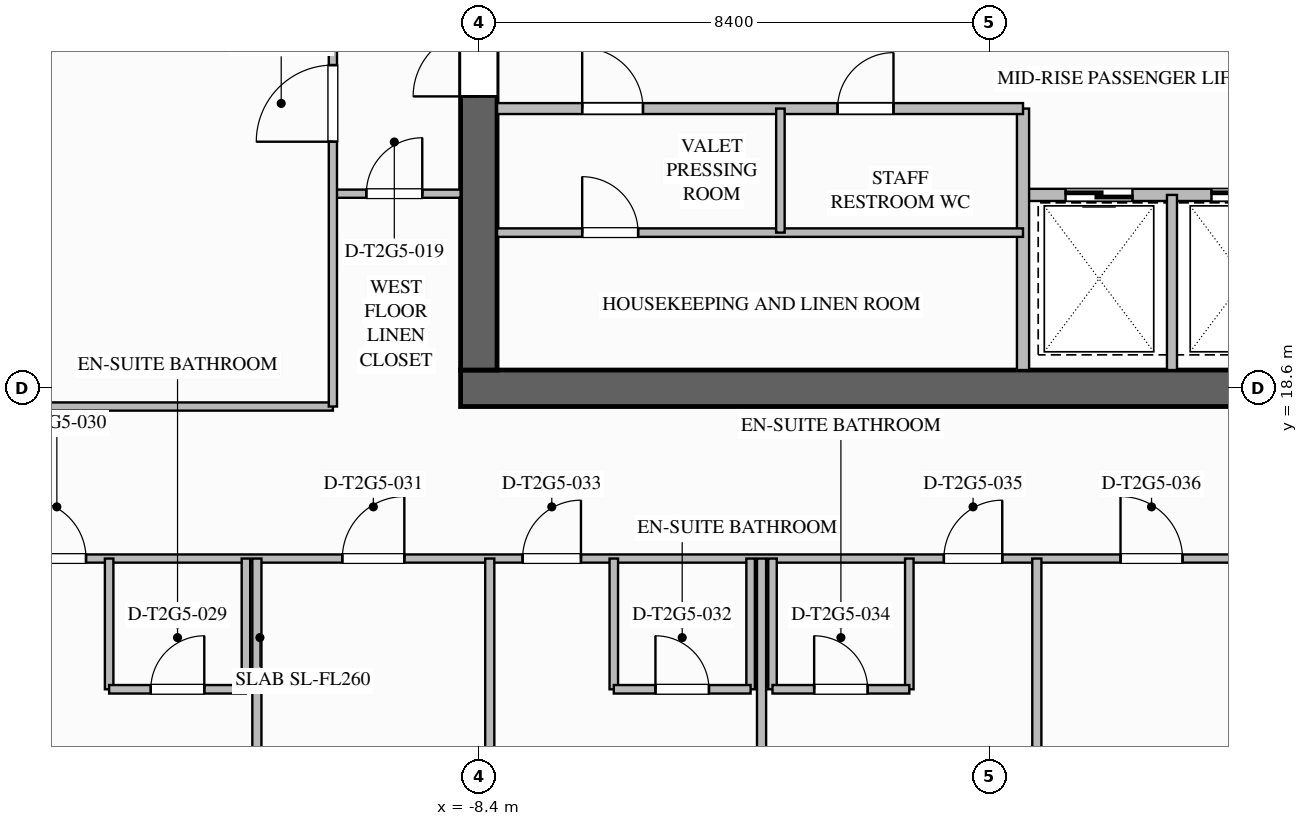
"""IFC4 building model, lengths in metres.
Left out: names, types, materials, properties, quantities, classifications, styles, units other than length and angle.
Written with IfcOpenShell. Run it as: python <this file> out.ifc"""

import sys

from ifc_helpers import new_model, si_unit, direction, frame, frame_2d, origin, place, context, subcontext, project, spatial, rectangle, extrude, element, fill, save


model = new_model("IFC4")
c1 = context("Model", 3, precision=1e-05, world=origin(), true_north=direction((0.0, 1.0)))
c2 = subcontext(c1, "Body", "Model", "MODEL_VIEW")
j1 = project(units=[si_unit("LENGTHUNIT", "METRE"), si_unit("PLANEANGLEUNIT", "RADIAN")], contexts=[c1])
p1 = place(None, origin())
s1 = spatial("IfcSite", under=j1, at=p1, CompositionType="ELEMENT")
p2 = place(p1, origin())
s2 = spatial("IfcBuilding", under=s1, at=p2, CompositionType="ELEMENT")
p3 = place(p2, frame((0.0, 0.0, 133.8)))
s3 = spatial("IfcBuildingStorey", under=s2, at=p3, CompositionType="ELEMENT", Elevation=133.8)
p4 = place(p3, frame((8.7, 18.6, 0.0), z_axis=(0.0, 0.0, 1.0), x_axis=(-1.0, 0.0, 0.0)))
e1 = element("IfcWall", 1, at=p4, inside=s3, PredefinedType="SHEAR", context=c2, shape_type="SweptSolid", body=[
    extrude(rectangle(XDim=17.4, YDim=0.6, at=frame_2d((8.7, 0.0))), origin(), (0.0, 0.0, 1.0), 3.5),
])
p5 = place(p3, frame((-8.4, 18.9, 0.0), z_axis=(0.0, 0.0, 1.0), x_axis=(0.0, 1.0, 0.0)))
e2 = element("IfcWall", 2, at=p5, inside=s3, PredefinedType="SHEAR", context=c2, shape_type="SweptSolid", body=[
    extrude(rectangle(XDim=16.2, YDim=0.6, at=frame_2d((8.1, 0.0))), origin(), (0.0, 0.0, 1.0), 3.5),
])
p6 = place(p5, frame((4.5, 0.0, 0.0)))
e3 = element("IfcOpeningElement", 3, at=p6, cuts=e2, PredefinedType="OPENING", context=c2, shape_type="SweptSolid", body=[
    extrude(rectangle(XDim=1.08, YDim=2.04, at=frame_2d((0.54, 1.02))), frame((0.0, 0.31, 0.0), z_axis=(0.0, -1.0, 0.0), x_axis=(1.0, 0.0, 0.0)), (0.0, 0.0, 1.0), 0.62),
])
p7 = place(p3, frame((8.1, 21.78, 0.0), z_axis=(0.0, 0.0, 1.0), x_axis=(-1.0, 0.0, 0.0)))
e4 = element("IfcWall", 4, at=p7, inside=s3, PredefinedType="SOLIDWALL", context=c2, shape_type="SweptSolid", body=[
    extrude(rectangle(XDim=7.55, YDim=0.2, at=frame_2d((3.775, 0.0))), origin(), (0.0, 0.0, 1.0), 3.24),
])
p8 = place(p7, frame((5.75, 0.0, 0.0)))
e5 = element("IfcOpeningElement", 5, at=p8, cuts=e4, PredefinedType="OPENING", context=c2, shape_type="SweptSolid", body=[
    extrude(rectangle(XDim=1.1, YDim=2.2, at=frame_2d((0.55, 1.1))), frame((0.0, 0.11, 0.0), z_axis=(0.0, -1.0, 0.0), x_axis=(1.0, 0.0, 0.0)), (0.0, 0.0, 1.0), 0.22),
])
p9 = place(p7, frame((3.35, 0.0, 0.0)))
e6 = element("IfcOpeningElement", 6, at=p9, cuts=e4, PredefinedType="OPENING", context=c2, shape_type="SweptSolid", body=[
    extrude(rectangle(XDim=1.1, YDim=2.2, at=frame_2d((0.55, 1.1))), frame((0.0, 0.11, 0.0), z_axis=(0.0, -1.0, 0.0), x_axis=(1.0, 0.0, 0.0)), (0.0, 0.0, 1.0), 0.22),
])
p10 = place(p7, frame((0.95, 0.0, 0.0)))
e7 = element("IfcOpeningElement", 7, at=p10, cuts=e4, PredefinedType="OPENING", context=c2, shape_type="SweptSolid", body=[
    extrude(rectangle(XDim=1.1, YDim=2.2, at=frame_2d((0.55, 1.1))), frame((0.0, 0.11, 0.0), z_axis=(0.0, -1.0, 0.0), x_axis=(1.0, 0.0, 0.0)), (0.0, 0.0, 1.0), 0.22),
])
p11 = place(p3, frame((0.55, 18.9, 0.0), z_axis=(0.0, 0.0, 1.0), x_axis=(0.0, 1.0, 0.0)))
e8 = element("IfcWall", 8, at=p11, inside=s3, PredefinedType="SOLIDWALL", context=c2, shape_type="SweptSolid", body=[
    extrude(rectangle(XDim=4.3, YDim=0.2, at=frame_2d((2.15, 0.0))), origin(), (0.0, 0.0, 1.0), 3.24),
])
p12 = place(p3, frame((3.0, 18.9, 0.0), z_axis=(0.0, 0.0, 1.0), x_axis=(0.0, 1.0, 0.0)))
e9 = element("IfcWall", 9, at=p12, inside=s3, PredefinedType="PARTITIONING", context=c2, shape_type="SweptSolid", body=[
    extrude(rectangle(XDim=2.88, YDim=0.165, at=frame_2d((1.44, 0.0))), origin(), (0.0, 0.0, 1.0), 3.24),
])
p13 = place(p3, frame((-8.1, 23.2, 0.0), z_axis=(0.0, 0.0, 1.0), x_axis=(1.0, 0.0, 0.0)))
e10 = element("IfcWall", 10, at=p13, inside=s3, PredefinedType="SOLIDWALL", context=c2, shape_type="SweptSolid", body=[
    extrude(rectangle(XDim=8.65, YDim=0.18, at=frame_2d((4.325, 0.0))), origin(), (0.0, 0.0, 1.0), 3.24),
])
p14 = place(p13, frame((1.4, 0.0, 0.0)))
e11 = element("IfcOpeningElement", 11, at=p14, cuts=e10, PredefinedType="OPENING", context=c2, shape_type="SweptSolid", body=[
    extrude(rectangle(XDim=1.0, YDim=2.1, at=frame_2d((0.5, 1.05))), frame((0.0, 0.1, 0.0), z_axis=(0.0, -1.0, 0.0), x_axis=(1.0, 0.0, 0.0)), (0.0, 0.0, 1.0), 0.2),
])
p15 = place(p13, frame((5.6, 0.0, 0.0)))
e12 = element("IfcOpeningElement", 12, at=p15, cuts=e10, PredefinedType="OPENING", context=c2, shape_type="SweptSolid", body=[
    extrude(rectangle(XDim=0.92, YDim=2.1, at=frame_2d((0.46, 1.05))), frame((0.0, 0.1, 0.0), z_axis=(0.0, -1.0, 0.0), x_axis=(1.0, 0.0, 0.0)), (0.0, 0.0, 1.0), 0.2),
])
p16 = place(p3, frame((-8.1, 21.16, 0.0), z_axis=(0.0, 0.0, 1.0), x_axis=(1.0, 0.0, 0.0)))
e13 = element("IfcWall", 13, at=p16, inside=s3, PredefinedType="PLUMBINGWALL", context=c2, shape_type="SweptSolid", body=[
    extrude(rectangle(XDim=8.65, YDim=0.14, at=frame_2d((4.325, 0.0))), origin(), (0.0, 0.0, 1.0), 3.24),
])
p17 = place(p16, frame((1.4, 0.0, 0.0)))
e14 = element("IfcOpeningElement", 14, at=p17, cuts=e13, PredefinedType="OPENING", context=c2, shape_type="SweptSolid", body=[
    extrude(rectangle(XDim=0.92, YDim=2.1, at=frame_2d((0.46, 1.05))), frame((0.0, 0.08, 0.0), z_axis=(0.0, -1.0, 0.0), x_axis=(1.0, 0.0, 0.0)), (0.0, 0.0, 1.0), 0.16),
])
p18 = place(p3, frame((-3.44, 21.16, 0.0), z_axis=(0.0, 0.0, 1.0), x_axis=(0.0, 1.0, 0.0)))
e15 = element("IfcWall", 15, at=p18, inside=s3, PredefinedType="PLUMBINGWALL", context=c2, shape_type="SweptSolid", body=[
    extrude(rectangle(XDim=2.04, YDim=0.14, at=frame_2d((1.02, 0.0))), origin(), (0.0, 0.0, 1.0), 3.24),
])
p19 = place(p3, frame((-10.8, 21.8, 0.0), z_axis=(0.0, 0.0, 1.0), x_axis=(1.0, 0.0, 0.0)))
e16 = element("IfcWall", 16, at=p19, inside=s3, PredefinedType="PARTITIONING", context=c2, shape_type="SweptSolid", body=[
    extrude(rectangle(XDim=2.1, YDim=0.135, at=frame_2d((1.05, 0.0))), origin(), (0.0, 0.0, 1.0), 3.24),
])
p20 = place(p19, frame((0.55, 0.0, 0.0)))
e17 = element("IfcOpeningElement", 17, at=p20, cuts=e16, PredefinedType="OPENING", context=c2, shape_type="SweptSolid", body=[
    extrude(rectangle(XDim=0.92, YDim=2.1, at=frame_2d((0.46, 1.05))), frame((0.0, 0.077, 0.0), z_axis=(0.0, -1.0, 0.0), x_axis=(1.0, 0.0, 0.0)), (0.0, 0.0, 1.0), 0.155),
])
p21 = place(p3, frame((-16.2, 18.3, 0.0), z_axis=(0.0, 0.0, 1.0), x_axis=(1.0, 0.0, 0.0)))
e18 = element("IfcWall", 18, at=p21, inside=s3, PredefinedType="PARTITIONING", context=c2, shape_type="SweptSolid", body=[
    extrude(rectangle(XDim=5.4, YDim=0.135, at=frame_2d((2.7, 0.0))), origin(), (0.0, 0.0, 1.0), 3.24),
])
p22 = place(p3, frame((-16.2, 15.8, 0.0), z_axis=(0.0, 0.0, 1.0), x_axis=(1.0, 0.0, 0.0)))
e19 = element("IfcWall", 19, at=p22, inside=s3, PredefinedType="PARTITIONING", context=c2, shape_type="SweptSolid", body=[
    extrude(rectangle(XDim=24.9, YDim=0.135, at=frame_2d((12.45, 0.0))), origin(), (0.0, 0.0, 1.0), 3.24),
])
p23 = place(p22, frame((0.38, 0.0, 0.0)))
e20 = element("IfcOpeningElement", 20, at=p23, cuts=e19, PredefinedType="OPENING", context=c2, shape_type="SweptSolid", body=[
    extrude(rectangle(XDim=0.96, YDim=2.15, at=frame_2d((0.48, 1.075))), frame((0.0, 0.077, 0.0), z_axis=(0.0, -1.0, 0.0), x_axis=(1.0, 0.0, 0.0)), (0.0, 0.0, 1.0), 0.155),
])
p24 = place(p22, frame((5.555, 0.0, 0.0)))
e21 = element("IfcOpeningElement", 21, at=p24, cuts=e19, PredefinedType="OPENING", context=c2, shape_type="SweptSolid", body=[
    extrude(rectangle(XDim=1.02, YDim=2.15, at=frame_2d((0.51, 1.075))), frame((0.0, 0.077, 0.0), z_axis=(0.0, -1.0, 0.0), x_axis=(1.0, 0.0, 0.0)), (0.0, 0.0, 1.0), 0.155),
])
p25 = place(p22, frame((8.52, 0.0, 0.0)))
e22 = element("IfcOpeningElement", 22, at=p25, cuts=e19, PredefinedType="OPENING", context=c2, shape_type="SweptSolid", body=[
    extrude(rectangle(XDim=0.96, YDim=2.15, at=frame_2d((0.48, 1.075))), frame((0.0, 0.077, 0.0), z_axis=(0.0, -1.0, 0.0), x_axis=(1.0, 0.0, 0.0)), (0.0, 0.0, 1.0), 0.155),
])
p26 = place(p22, frame((15.448, 0.0, 0.0)))
e23 = element("IfcOpeningElement", 23, at=p26, cuts=e19, PredefinedType="OPENING", context=c2, shape_type="SweptSolid", body=[
    extrude(rectangle(XDim=0.96, YDim=2.15, at=frame_2d((0.48, 1.075))), frame((0.0, 0.077, 0.0), z_axis=(0.0, -1.0, 0.0), x_axis=(1.0, 0.0, 0.0)), (0.0, 0.0, 1.0), 0.155),
])
p27 = place(p22, frame((18.354, 0.0, 0.0)))
e24 = element("IfcOpeningElement", 24, at=p27, cuts=e19, PredefinedType="OPENING", context=c2, shape_type="SweptSolid", body=[
    extrude(rectangle(XDim=1.02, YDim=2.15, at=frame_2d((0.51, 1.075))), frame((0.0, 0.077, 0.0), z_axis=(0.0, -1.0, 0.0), x_axis=(1.0, 0.0, 0.0)), (0.0, 0.0, 1.0), 0.155),
])
p28 = place(p22, frame((23.56, 0.0, 0.0)))
e25 = element("IfcOpeningElement", 25, at=p28, cuts=e19, PredefinedType="OPENING", context=c2, shape_type="SweptSolid", body=[
    extrude(rectangle(XDim=0.96, YDim=2.15, at=frame_2d((0.48, 1.075))), frame((0.0, 0.077, 0.0), z_axis=(0.0, -1.0, 0.0), x_axis=(1.0, 0.0, 0.0)), (0.0, 0.0, 1.0), 0.155),
])
p29 = place(p3, frame((-10.8, 18.3, 0.0), z_axis=(0.0, 0.0, 1.0), x_axis=(0.0, 1.0, 0.0)))
e26 = element("IfcWall", 26, at=p29, inside=s3, PredefinedType="PARTITIONING", context=c2, shape_type="SweptSolid", body=[
    extrude(rectangle(XDim=17.4, YDim=0.135, at=frame_2d((8.7, 0.0))), origin(), (0.0, 0.0, 1.0), 3.24),
])
p30 = place(p29, frame((4.355, 0.0, 0.0)))
e27 = element("IfcOpeningElement", 27, at=p30, cuts=e26, PredefinedType="OPENING", context=c2, shape_type="SweptSolid", body=[
    extrude(rectangle(XDim=1.26, YDim=2.2, at=frame_2d((0.63, 1.1))), frame((0.0, 0.077, 0.0), z_axis=(0.0, -1.0, 0.0), x_axis=(1.0, 0.0, 0.0)), (0.0, 0.0, 1.0), 0.155),
])
p31 = place(p29, frame((10.69, 0.0, 0.0)))
e28 = element("IfcOpeningElement", 28, at=p31, cuts=e26, PredefinedType="OPENING", context=c2, shape_type="SweptSolid", body=[
    extrude(rectangle(XDim=1.02, YDim=2.15, at=frame_2d((0.51, 1.075))), frame((0.0, 0.077, 0.0), z_axis=(0.0, -1.0, 0.0), x_axis=(1.0, 0.0, 0.0)), (0.0, 0.0, 1.0), 0.155),
])
p32 = place(p3, frame((-14.48, 15.8, 0.0), z_axis=(0.0, 0.0, 1.0), x_axis=(0.0, -1.0, 0.0)))
e29 = element("IfcWall", 29, at=p32, inside=s3, PredefinedType="PLUMBINGWALL", context=c2, shape_type="SweptSolid", body=[
    extrude(rectangle(XDim=2.15, YDim=0.14, at=frame_2d((1.075, 0.0))), origin(), (0.0, 0.0, 1.0), 3.24),
])
p33 = place(p3, frame((-12.23, 15.8, 0.0), z_axis=(0.0, 0.0, 1.0), x_axis=(0.0, -1.0, 0.0)))
e30 = element("IfcWall", 30, at=p33, inside=s3, PredefinedType="PLUMBINGWALL", context=c2, shape_type="SweptSolid", body=[
    extrude(rectangle(XDim=2.15, YDim=0.14, at=frame_2d((1.075, 0.0))), origin(), (0.0, 0.0, 1.0), 2.765),
])
p34 = place(p3, frame((-14.48, 13.65, 0.0), z_axis=(0.0, 0.0, 1.0), x_axis=(1.0, 0.0, 0.0)))
e31 = element("IfcWall", 31, at=p34, inside=s3, PredefinedType="PLUMBINGWALL", context=c2, shape_type="SweptSolid", body=[
    extrude(rectangle(XDim=2.25, YDim=0.14, at=frame_2d((1.125, 0.0))), origin(), (0.0, 0.0, 1.0), 3.24),
])
p35 = place(p34, frame((0.685, 0.0, 0.0)))
e32 = element("IfcOpeningElement", 32, at=p35, cuts=e31, PredefinedType="OPENING", context=c2, shape_type="SweptSolid", body=[
    extrude(rectangle(XDim=0.88, YDim=2.1, at=frame_2d((0.44, 1.05))), frame((0.0, 0.08, 0.0), z_axis=(0.0, -1.0, 0.0), x_axis=(1.0, 0.0, 0.0)), (0.0, 0.0, 1.0), 0.16),
])
p36 = place(p3, frame((-12.05, 0.12, 0.0), z_axis=(0.0, 0.0, 1.0), x_axis=(0.0, 1.0, 0.0)))
e33 = element("IfcWall", 33, at=p36, inside=s3, PredefinedType="PARTITIONING", context=c2, shape_type="SweptSolid", body=[
    extrude(rectangle(XDim=15.68, YDim=0.15, at=frame_2d((7.84, 0.0))), origin(), (0.0, 0.0, 1.0), 2.765),
])
p37 = place(p3, frame((-8.22, 0.12, 0.0), z_axis=(0.0, 0.0, 1.0), x_axis=(0.0, 1.0, 0.0)))
e34 = element("IfcWall", 34, at=p37, inside=s3, PredefinedType="PARTITIONING", context=c2, shape_type="SweptSolid", body=[
    extrude(rectangle(XDim=15.68, YDim=0.15, at=frame_2d((7.84, 0.0))), origin(), (0.0, 0.0, 1.0), 2.53),
])
for number, where, z_axis, x_axis in (
    (35, (-6.18, 15.8, 0.0), (0.0, 0.0, 1.0), (0.0, -1.0, 0.0)),
    (36, (-3.93, 15.8, 0.0), (0.0, 0.0, 1.0), (0.0, -1.0, 0.0)),
):
    element("IfcWall", number, at=place(p3, frame(where, z_axis=z_axis, x_axis=x_axis)), inside=s3, PredefinedType="PLUMBINGWALL", context=c2, shape_type="SweptSolid", body=[
        extrude(rectangle(XDim=2.15, YDim=0.14, at=frame_2d((1.075, 0.0))), origin(), (0.0, 0.0, 1.0), 3.24),
    ])
p38 = place(p3, frame((-6.18, 13.65, 0.0), z_axis=(0.0, 0.0, 1.0), x_axis=(1.0, 0.0, 0.0)))
e37 = element("IfcWall", 37, at=p38, inside=s3, PredefinedType="PLUMBINGWALL", context=c2, shape_type="SweptSolid", body=[
    extrude(rectangle(XDim=2.25, YDim=0.14, at=frame_2d((1.125, 0.0))), origin(), (0.0, 0.0, 1.0), 3.24),
])
p39 = place(p38, frame((0.685, 0.0, 0.0)))
e38 = element("IfcOpeningElement", 38, at=p39, cuts=e37, PredefinedType="OPENING", context=c2, shape_type="SweptSolid", body=[
    extrude(rectangle(XDim=0.88, YDim=2.1, at=frame_2d((0.44, 1.05))), frame((0.0, 0.08, 0.0), z_axis=(0.0, -1.0, 0.0), x_axis=(1.0, 0.0, 0.0)), (0.0, 0.0, 1.0), 0.16),
])
p40 = place(p3, frame((-3.75, 0.8, 0.0), z_axis=(0.0, 0.0, 1.0), x_axis=(0.0, 1.0, 0.0)))
e39 = element("IfcWall", 39, at=p40, inside=s3, PredefinedType="PARTITIONING", context=c2, shape_type="SweptSolid", body=[
    extrude(rectangle(XDim=15.0, YDim=0.15, at=frame_2d((7.5, 0.0))), origin(), (0.0, 0.0, 1.0), 3.24),
])
for number, where, z_axis, x_axis in (
    (40, (-3.57, 15.8, 0.0), (0.0, 0.0, 1.0), (0.0, -1.0, 0.0)),
    (41, (-1.32, 15.8, 0.0), (0.0, 0.0, 1.0), (0.0, -1.0, 0.0)),
):
    element("IfcWall", number, at=place(p3, frame(where, z_axis=z_axis, x_axis=x_axis)), inside=s3, PredefinedType="PLUMBINGWALL", context=c2, shape_type="SweptSolid", body=[
        extrude(rectangle(XDim=2.15, YDim=0.14, at=frame_2d((1.075, 0.0))), origin(), (0.0, 0.0, 1.0), 3.24),
    ])
p41 = place(p3, frame((-3.57, 13.65, 0.0), z_axis=(0.0, 0.0, 1.0), x_axis=(1.0, 0.0, 0.0)))
e42 = element("IfcWall", 42, at=p41, inside=s3, PredefinedType="PLUMBINGWALL", context=c2, shape_type="SweptSolid", body=[
    extrude(rectangle(XDim=2.25, YDim=0.14, at=frame_2d((1.125, 0.0))), origin(), (0.0, 0.0, 1.0), 3.24),
])
p42 = place(p41, frame((0.685, 0.0, 0.0)))
e43 = element("IfcOpeningElement", 43, at=p42, cuts=e42, PredefinedType="OPENING", context=c2, shape_type="SweptSolid", body=[
    extrude(rectangle(XDim=0.88, YDim=2.1, at=frame_2d((0.44, 1.05))), frame((0.0, 0.08, 0.0), z_axis=(0.0, -1.0, 0.0), x_axis=(1.0, 0.0, 0.0)), (0.0, 0.0, 1.0), 0.16),
])
p43 = place(p3, frame((0.777, 0.8, 0.0), z_axis=(0.0, 0.0, 1.0), x_axis=(0.0, 1.0, 0.0)))
e44 = element("IfcWall", 44, at=p43, inside=s3, PredefinedType="PARTITIONING", context=c2, shape_type="SweptSolid", body=[
    extrude(rectangle(XDim=15.0, YDim=0.15, at=frame_2d((7.5, 0.0))), origin(), (0.0, 0.0, 1.0), 3.24),
])
p44 = place(p8, origin())
e45 = element("IfcDoor", 45, at=p44, inside=s3, OperationType="SLIDING_TO_LEFT", PredefinedType="DOOR", context=c2, shape_type="SweptSolid", body=[
    extrude(rectangle(XDim=1.1, YDim=2.2, at=frame_2d((0.55, 1.1))), frame((0.0, 0.025, 0.0), z_axis=(0.0, -1.0, 0.0), x_axis=(1.0, 0.0, 0.0)), (0.0, 0.0, 1.0), 0.05),
])
fill(e5, e45)
p45 = place(p9, origin())
e46 = element("IfcDoor", 46, at=p45, inside=s3, OperationType="SLIDING_TO_LEFT", PredefinedType="DOOR", context=c2, shape_type="SweptSolid", body=[
    extrude(rectangle(XDim=1.1, YDim=2.2, at=frame_2d((0.55, 1.1))), frame((0.0, 0.025, 0.0), z_axis=(0.0, -1.0, 0.0), x_axis=(1.0, 0.0, 0.0)), (0.0, 0.0, 1.0), 0.05),
])
fill(e6, e46)
p46 = place(p6, origin())
e47 = element("IfcDoor", 47, at=p46, inside=s3, OperationType="SINGLE_SWING_LEFT", PredefinedType="DOOR", context=c2, shape_type="SweptSolid", body=[
    extrude(rectangle(XDim=1.08, YDim=2.04, at=frame_2d((0.54, 1.02))), frame((0.0, 0.025, 0.0), z_axis=(0.0, -1.0, 0.0), x_axis=(1.0, 0.0, 0.0)), (0.0, 0.0, 1.0), 0.05),
])
fill(e3, e47)
p47 = place(p14, origin())
e48 = element("IfcDoor", 48, at=p47, inside=s3, OperationType="SINGLE_SWING_LEFT", PredefinedType="DOOR", context=c2, shape_type="SweptSolid", body=[
    extrude(rectangle(XDim=1.0, YDim=2.1, at=frame_2d((0.5, 1.05))), frame((0.0, 0.025, 0.0), z_axis=(0.0, -1.0, 0.0), x_axis=(1.0, 0.0, 0.0)), (0.0, 0.0, 1.0), 0.05),
])
fill(e11, e48)
p48 = place(p15, origin())
e49 = element("IfcDoor", 49, at=p48, inside=s3, OperationType="SINGLE_SWING_RIGHT", PredefinedType="DOOR", context=c2, shape_type="SweptSolid", body=[
    extrude(rectangle(XDim=0.92, YDim=2.1, at=frame_2d((0.46, 1.05))), frame((0.0, 0.025, 0.0), z_axis=(0.0, -1.0, 0.0), x_axis=(1.0, 0.0, 0.0)), (0.0, 0.0, 1.0), 0.05),
])
fill(e12, e49)
p49 = place(p17, origin())
e50 = element("IfcDoor", 50, at=p49, inside=s3, OperationType="SINGLE_SWING_LEFT", PredefinedType="DOOR", context=c2, shape_type="SweptSolid", body=[
    extrude(rectangle(XDim=0.92, YDim=2.1, at=frame_2d((0.46, 1.05))), frame((0.0, 0.025, 0.0), z_axis=(0.0, -1.0, 0.0), x_axis=(1.0, 0.0, 0.0)), (0.0, 0.0, 1.0), 0.05),
])
fill(e14, e50)
p50 = place(p20, origin())
e51 = element("IfcDoor", 51, at=p50, inside=s3, OperationType="SINGLE_SWING_RIGHT", PredefinedType="DOOR", context=c2, shape_type="SweptSolid", body=[
    extrude(rectangle(XDim=0.92, YDim=2.1, at=frame_2d((0.46, 1.05))), frame((0.0, 0.025, 0.0), z_axis=(0.0, -1.0, 0.0), x_axis=(1.0, 0.0, 0.0)), (0.0, 0.0, 1.0), 0.05),
])
fill(e17, e51)
p51 = place(p35, origin())
e52 = element("IfcDoor", 52, at=p51, inside=s3, OperationType="SINGLE_SWING_RIGHT", PredefinedType="DOOR", context=c2, shape_type="SweptSolid", body=[
    extrude(rectangle(XDim=0.88, YDim=2.1, at=frame_2d((0.44, 1.05))), frame((0.0, 0.025, 0.0), z_axis=(0.0, -1.0, 0.0), x_axis=(1.0, 0.0, 0.0)), (0.0, 0.0, 1.0), 0.05),
])
fill(e32, e52)
p52 = place(p23, origin())
e53 = element("IfcDoor", 53, at=p52, inside=s3, OperationType="SINGLE_SWING_LEFT", PredefinedType="DOOR", context=c2, shape_type="SweptSolid", body=[
    extrude(rectangle(XDim=0.96, YDim=2.15, at=frame_2d((0.48, 1.075))), frame((0.0, 0.025, 0.0), z_axis=(0.0, -1.0, 0.0), x_axis=(1.0, 0.0, 0.0)), (0.0, 0.0, 1.0), 0.05),
])
fill(e20, e53)
p53 = place(p24, origin())
e54 = element("IfcDoor", 54, at=p53, inside=s3, OperationType="SINGLE_SWING_RIGHT", PredefinedType="DOOR", context=c2, shape_type="SweptSolid", body=[
    extrude(rectangle(XDim=1.02, YDim=2.15, at=frame_2d((0.51, 1.075))), frame((0.0, 0.025, 0.0), z_axis=(0.0, -1.0, 0.0), x_axis=(1.0, 0.0, 0.0)), (0.0, 0.0, 1.0), 0.05),
])
fill(e21, e54)
p54 = place(p39, origin())
e55 = element("IfcDoor", 55, at=p54, inside=s3, OperationType="SINGLE_SWING_LEFT", PredefinedType="DOOR", context=c2, shape_type="SweptSolid", body=[
    extrude(rectangle(XDim=0.88, YDim=2.1, at=frame_2d((0.44, 1.05))), frame((0.0, 0.025, 0.0), z_axis=(0.0, -1.0, 0.0), x_axis=(1.0, 0.0, 0.0)), (0.0, 0.0, 1.0), 0.05),
])
fill(e38, e55)
p55 = place(p25, origin())
e56 = element("IfcDoor", 56, at=p55, inside=s3, OperationType="SINGLE_SWING_RIGHT", PredefinedType="DOOR", context=c2, shape_type="SweptSolid", body=[
    extrude(rectangle(XDim=0.96, YDim=2.15, at=frame_2d((0.48, 1.075))), frame((0.0, 0.025, 0.0), z_axis=(0.0, -1.0, 0.0), x_axis=(1.0, 0.0, 0.0)), (0.0, 0.0, 1.0), 0.05),
])
fill(e22, e56)
p56 = place(p42, origin())
e57 = element("IfcDoor", 57, at=p56, inside=s3, OperationType="SINGLE_SWING_LEFT", PredefinedType="DOOR", context=c2, shape_type="SweptSolid", body=[
    extrude(rectangle(XDim=0.88, YDim=2.1, at=frame_2d((0.44, 1.05))), frame((0.0, 0.025, 0.0), z_axis=(0.0, -1.0, 0.0), x_axis=(1.0, 0.0, 0.0)), (0.0, 0.0, 1.0), 0.05),
])
fill(e43, e57)
p57 = place(p26, origin())
e58 = element("IfcDoor", 58, at=p57, inside=s3, OperationType="SINGLE_SWING_RIGHT", PredefinedType="DOOR", context=c2, shape_type="SweptSolid", body=[
    extrude(rectangle(XDim=0.96, YDim=2.15, at=frame_2d((0.48, 1.075))), frame((0.0, 0.025, 0.0), z_axis=(0.0, -1.0, 0.0), x_axis=(1.0, 0.0, 0.0)), (0.0, 0.0, 1.0), 0.05),
])
fill(e23, e58)
p58 = place(p27, origin())
e59 = element("IfcDoor", 59, at=p58, inside=s3, OperationType="SINGLE_SWING_LEFT", PredefinedType="DOOR", context=c2, shape_type="SweptSolid", body=[
    extrude(rectangle(XDim=1.02, YDim=2.15, at=frame_2d((0.51, 1.075))), frame((0.0, 0.025, 0.0), z_axis=(0.0, -1.0, 0.0), x_axis=(1.0, 0.0, 0.0)), (0.0, 0.0, 1.0), 0.05),
])
fill(e24, e59)
p59 = place(p30, origin())
e60 = element("IfcDoor", 60, at=p59, inside=s3, OperationType="SINGLE_SWING_LEFT", PredefinedType="DOOR", context=c2, shape_type="SweptSolid", body=[
    extrude(rectangle(XDim=1.26, YDim=2.2, at=frame_2d((0.63, 1.1))), frame((0.0, 0.025, 0.0), z_axis=(0.0, -1.0, 0.0), x_axis=(1.0, 0.0, 0.0)), (0.0, 0.0, 1.0), 0.05),
])
fill(e27, e60)
save(model, sys.argv[1])
